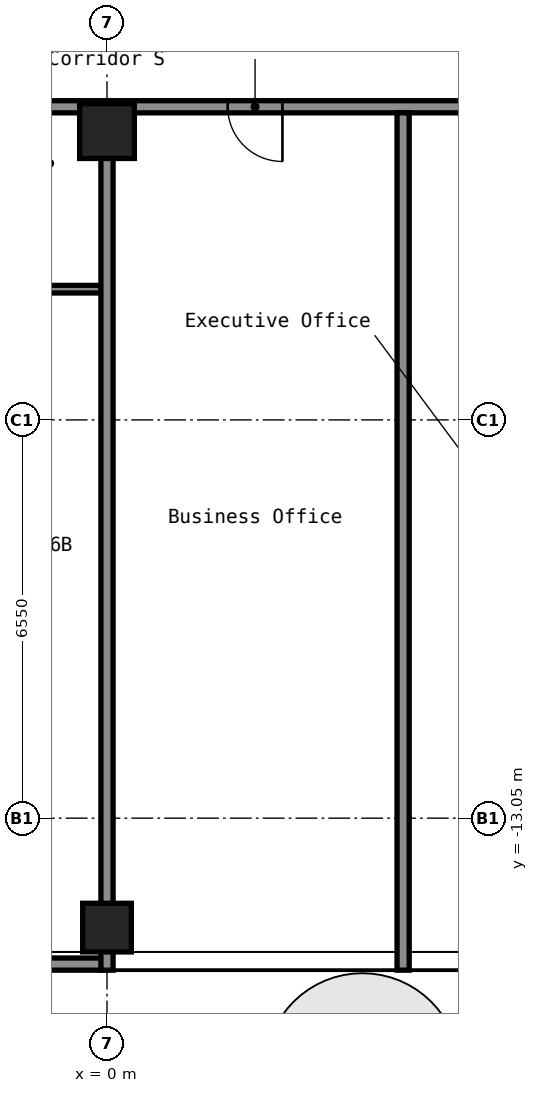
"""IFC4 building model, lengths in metres.
Left out: names, types, materials, properties, quantities, classifications, styles, units other than length and angle.
Written with IfcOpenShell. Run it as: python <this file> out.ifc"""

import sys

from ifc_helpers import new_model, si_unit, direction, frame, frame_2d, origin, origin_2d, place, context, subcontext, project, spatial, rectangle, hollow_rectangle, extrude, element, fill, save


model = new_model("IFC4")
c1 = context("Model", 3, precision=1e-05, world=origin(), true_north=direction((0.0, 1.0)))
c2 = subcontext(c1, "Body", "Model", "MODEL_VIEW")
j1 = project(units=[si_unit("LENGTHUNIT", "METRE"), si_unit("PLANEANGLEUNIT", "RADIAN")], contexts=[c1])
p1 = place(None, origin())
s1 = spatial("IfcSite", under=j1, at=p1, CompositionType="ELEMENT")
p2 = place(p1, origin())
s2 = spatial("IfcBuilding", under=s1, at=p2, CompositionType="ELEMENT")
p3 = place(p2, frame((0.0, 0.0, 94.6)))
s3 = spatial("IfcBuildingStorey", under=s2, at=p3, CompositionType="ELEMENT", Elevation=94.6)
p4 = place(p3, frame((0.0, -14.85, 0.0), z_axis=(0.0, 0.0, 1.0), x_axis=(1.0, 0.0, 0.0)))
e1 = element("IfcColumn", 1, at=p4, inside=s3, PredefinedType="COLUMN", context=c2, shape_type="SweptSolid", body=[
    extrude(hollow_rectangle(XDim=0.8, YDim=0.8, WallThickness=0.032, at=origin_2d()), origin(), (0.0, 0.0, 1.0), 2.8),
])
p5 = place(p3, frame((0.0, -1.75, 0.0), z_axis=(0.0, 0.0, 1.0), x_axis=(1.0, 0.0, 0.0)))
e2 = element("IfcColumn", 2, at=p5, inside=s3, PredefinedType="COLUMN", context=c2, shape_type="SweptSolid", body=[
    extrude(hollow_rectangle(XDim=0.9, YDim=0.9, WallThickness=0.036, at=origin_2d()), origin(), (0.0, 0.0, 1.0), 2.8),
])
p6 = place(p3, frame((-2.438, -4.35, 0.0), z_axis=(0.0, 0.0, 1.0), x_axis=(1.0, 0.0, 0.0)))
e3 = element("IfcWall", 3, at=p6, inside=s3, PredefinedType="PARTITIONING", context=c2, shape_type="SweptSolid", body=[
    extrude(rectangle(XDim=2.337, YDim=0.125, at=frame_2d((1.169, 0.0))), origin(), (0.0, 0.0, 1.0), 2.8),
])
p7 = place(p3, frame((-16.8, -1.35, 0.0), z_axis=(0.0, 0.0, 1.0), x_axis=(1.0, 0.0, 0.0)))
e4 = element("IfcWall", 4, at=p7, inside=s3, PredefinedType="PARTITIONING", context=c2, shape_type="SweptSolid", body=[
    extrude(rectangle(XDim=33.6, YDim=0.2, at=frame_2d((16.8, 0.0))), origin(), (0.0, 0.0, 1.0), 2.8),
])
p8 = place(p7, frame((2.85, 0.0, 0.0)))
e5 = element("IfcOpeningElement", 5, at=p8, cuts=e4, PredefinedType="OPENING", context=c2, shape_type="SweptSolid", body=[
    extrude(rectangle(XDim=1.0, YDim=2.1, at=frame_2d((0.5, 1.05))), frame((0.0, 0.11, 0.0), z_axis=(0.0, -1.0, 0.0), x_axis=(1.0, 0.0, 0.0)), (0.0, 0.0, 1.0), 0.22),
])
p9 = place(p7, frame((4.55, 0.0, 0.0)))
e6 = element("IfcOpeningElement", 6, at=p9, cuts=e4, PredefinedType="OPENING", context=c2, shape_type="SweptSolid", body=[
    extrude(rectangle(XDim=1.0, YDim=2.1, at=frame_2d((0.5, 1.05))), frame((0.0, 0.11, 0.0), z_axis=(0.0, -1.0, 0.0), x_axis=(1.0, 0.0, 0.0)), (0.0, 0.0, 1.0), 0.22),
])
p10 = place(p7, frame((11.25, 0.0, 0.0)))
e7 = element("IfcOpeningElement", 7, at=p10, cuts=e4, PredefinedType="OPENING", context=c2, shape_type="SweptSolid", body=[
    extrude(rectangle(XDim=1.0, YDim=2.1, at=frame_2d((0.5, 1.05))), frame((0.0, 0.11, 0.0), z_axis=(0.0, -1.0, 0.0), x_axis=(1.0, 0.0, 0.0)), (0.0, 0.0, 1.0), 0.22),
])
p11 = place(p7, frame((12.95, 0.0, 0.0)))
e8 = element("IfcOpeningElement", 8, at=p11, cuts=e4, PredefinedType="OPENING", context=c2, shape_type="SweptSolid", body=[
    extrude(rectangle(XDim=1.0, YDim=2.1, at=frame_2d((0.5, 1.05))), frame((0.0, 0.11, 0.0), z_axis=(0.0, -1.0, 0.0), x_axis=(1.0, 0.0, 0.0)), (0.0, 0.0, 1.0), 0.22),
])
p12 = place(p7, frame((18.785, 0.0, 0.0)))
e9 = element("IfcOpeningElement", 9, at=p12, cuts=e4, PredefinedType="OPENING", context=c2, shape_type="SweptSolid", body=[
    extrude(rectangle(XDim=0.9, YDim=2.1, at=frame_2d((0.45, 1.05))), frame((0.0, 0.11, 0.0), z_axis=(0.0, -1.0, 0.0), x_axis=(1.0, 0.0, 0.0)), (0.0, 0.0, 1.0), 0.22),
])
p13 = place(p7, frame((22.985, 0.0, 0.0)))
e10 = element("IfcOpeningElement", 10, at=p13, cuts=e4, PredefinedType="OPENING", context=c2, shape_type="SweptSolid", body=[
    extrude(rectangle(XDim=0.9, YDim=2.1, at=frame_2d((0.45, 1.05))), frame((0.0, 0.11, 0.0), z_axis=(0.0, -1.0, 0.0), x_axis=(1.0, 0.0, 0.0)), (0.0, 0.0, 1.0), 0.22),
])
p14 = place(p7, frame((28.05, 0.0, 0.0)))
e11 = element("IfcOpeningElement", 11, at=p14, cuts=e4, PredefinedType="OPENING", context=c2, shape_type="SweptSolid", body=[
    extrude(rectangle(XDim=1.0, YDim=2.1, at=frame_2d((0.5, 1.05))), frame((0.0, 0.11, 0.0), z_axis=(0.0, -1.0, 0.0), x_axis=(1.0, 0.0, 0.0)), (0.0, 0.0, 1.0), 0.22),
])
p15 = place(p7, frame((29.75, 0.0, 0.0)))
e12 = element("IfcOpeningElement", 12, at=p15, cuts=e4, PredefinedType="OPENING", context=c2, shape_type="SweptSolid", body=[
    extrude(rectangle(XDim=1.0, YDim=2.1, at=frame_2d((0.5, 1.05))), frame((0.0, 0.11, 0.0), z_axis=(0.0, -1.0, 0.0), x_axis=(1.0, 0.0, 0.0)), (0.0, 0.0, 1.0), 0.22),
])
p16 = place(p3, frame((0.0, -15.55, 0.0), z_axis=(0.0, 0.0, 1.0), x_axis=(0.0, 1.0, 0.0)))
e13 = element("IfcWall", 13, at=p16, inside=s3, PredefinedType="PARTITIONING", context=c2, shape_type="SweptSolid", body=[
    extrude(rectangle(XDim=13.36, YDim=0.2, at=frame_2d((6.68, 0.0))), origin(), (0.0, 0.0, 1.0), 2.8),
])
p17 = place(p3, frame((4.87, -15.55, 0.0), z_axis=(0.0, 0.0, 1.0), x_axis=(0.0, 1.0, 0.0)))
e14 = element("IfcWall", 14, at=p17, inside=s3, PredefinedType="PARTITIONING", context=c2, shape_type="SweptSolid", body=[
    extrude(rectangle(XDim=14.1, YDim=0.2, at=frame_2d((7.05, 0.0))), origin(), (0.0, 0.0, 1.0), 2.8),
])
p18 = place(p12, origin())
e15 = element("IfcDoor", 15, at=p18, inside=s3, OperationType="SINGLE_SWING_RIGHT", PredefinedType="DOOR", context=c2, shape_type="SweptSolid", body=[
    extrude(rectangle(XDim=0.9, YDim=2.1, at=frame_2d((0.45, 1.05))), frame((0.0, 0.025, 0.0), z_axis=(0.0, -1.0, 0.0), x_axis=(1.0, 0.0, 0.0)), (0.0, 0.0, 1.0), 0.05),
])
fill(e9, e15)
save(model, sys.argv[1])
